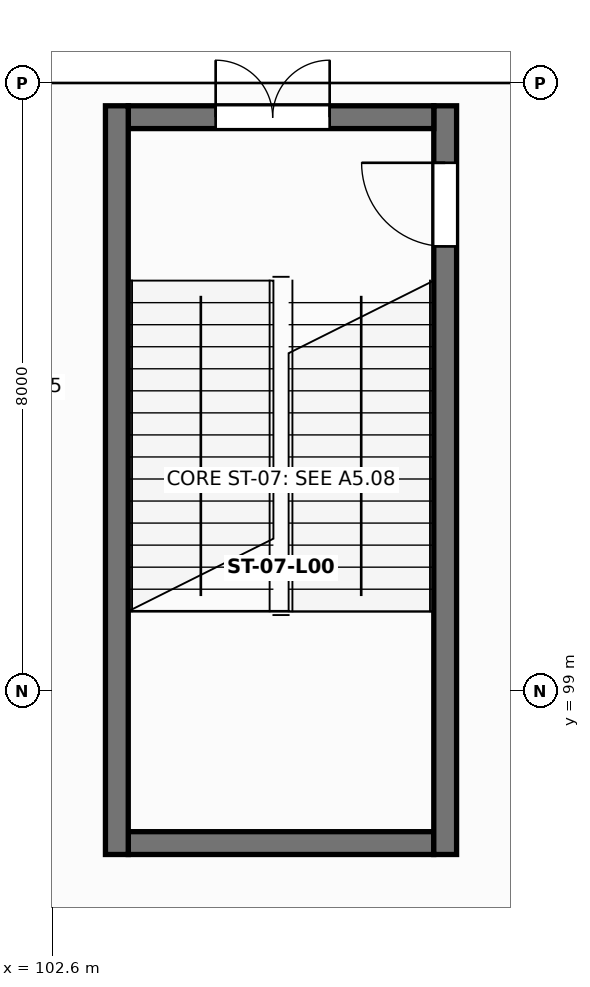
"""IFC4 building model, lengths in metres.
Left out: names, types, materials, properties, quantities, classifications, styles, units other than length and angle.
Written with IfcOpenShell. Run it as: python <this file> out.ifc"""

import sys

from ifc_helpers import new_model, si_unit, direction, frame, frame_2d, origin, place, context, subcontext, project, spatial, rectangle, extrude, element, fill, save


model = new_model("IFC4")
c1 = context("Model", 3, precision=1e-05, world=origin(), true_north=direction((0.0, 1.0)))
c2 = subcontext(c1, "Body", "Model", "MODEL_VIEW")
j1 = project(units=[si_unit("LENGTHUNIT", "METRE"), si_unit("PLANEANGLEUNIT", "RADIAN")], contexts=[c1])
p1 = place(None, origin())
s1 = spatial("IfcSite", under=j1, at=p1, CompositionType="ELEMENT")
p2 = place(p1, origin())
s2 = spatial("IfcBuilding", under=s1, at=p2, CompositionType="ELEMENT")
p3 = place(p2, origin())
s3 = spatial("IfcBuildingStorey", under=s2, at=p3, CompositionType="ELEMENT", Elevation=0.0)
p4 = place(p3, frame((103.6, 97.0, 0.0), z_axis=(0.0, 0.0, 1.0), x_axis=(1.0, 0.0, 0.0)))
e1 = element("IfcWall", 1, at=p4, inside=s3, PredefinedType="SHEAR", context=c2, shape_type="SweptSolid", body=[
    extrude(rectangle(XDim=4.02, YDim=0.3, at=frame_2d((2.01, 0.0))), origin(), (0.0, 0.0, 1.0), 5.755),
])
p5 = place(p3, frame((107.77, 96.85, 0.0), z_axis=(0.0, 0.0, 1.0), x_axis=(0.0, 1.0, 0.0)))
e2 = element("IfcWall", 2, at=p5, inside=s3, PredefinedType="SHEAR", context=c2, shape_type="SweptSolid", body=[
    extrude(rectangle(XDim=9.85, YDim=0.3, at=frame_2d((4.925, 0.0))), origin(), (0.0, 0.0, 1.0), 5.755),
])
p6 = place(p5, frame((8.0, 0.0, 0.0)))
e3 = element("IfcOpeningElement", 3, at=p6, cuts=e2, PredefinedType="OPENING", context=c2, shape_type="SweptSolid", body=[
    extrude(rectangle(XDim=1.1, YDim=2.15, at=frame_2d((0.55, 1.075))), frame((0.0, 0.16, 0.0), z_axis=(0.0, -1.0, 0.0), x_axis=(1.0, 0.0, 0.0)), (0.0, 0.0, 1.0), 0.32),
])
p7 = place(p3, frame((107.62, 106.55, 0.0), z_axis=(0.0, 0.0, 1.0), x_axis=(-1.0, 0.0, 0.0)))
e4 = element("IfcWall", 4, at=p7, inside=s3, PredefinedType="SHEAR", context=c2, shape_type="SweptSolid", body=[
    extrude(rectangle(XDim=4.02, YDim=0.3, at=frame_2d((2.01, 0.0))), origin(), (0.0, 0.0, 1.0), 5.755),
])
p8 = place(p7, frame((1.37, 0.0, 0.0)))
e5 = element("IfcOpeningElement", 5, at=p8, cuts=e4, PredefinedType="OPENING", context=c2, shape_type="SweptSolid", body=[
    extrude(rectangle(XDim=1.5, YDim=2.2, at=frame_2d((0.75, 1.1))), frame((0.0, 0.16, 0.0), z_axis=(0.0, -1.0, 0.0), x_axis=(1.0, 0.0, 0.0)), (0.0, 0.0, 1.0), 0.32),
])
p9 = place(p3, frame((103.45, 106.7, 0.0), z_axis=(0.0, 0.0, 1.0), x_axis=(0.0, -1.0, 0.0)))
e6 = element("IfcWall", 6, at=p9, inside=s3, PredefinedType="SHEAR", context=c2, shape_type="SweptSolid", body=[
    extrude(rectangle(XDim=9.85, YDim=0.3, at=frame_2d((4.925, 0.0))), origin(), (0.0, 0.0, 1.0), 5.755),
])
p10 = place(p6, origin())
e7 = element("IfcDoor", 7, at=p10, inside=s3, OperationType="SINGLE_SWING_RIGHT", PredefinedType="DOOR", context=c2, shape_type="SweptSolid", body=[
    extrude(rectangle(XDim=1.1, YDim=2.15, at=frame_2d((0.55, 1.075))), frame((0.0, 0.025, 0.0), z_axis=(0.0, -1.0, 0.0), x_axis=(1.0, 0.0, 0.0)), (0.0, 0.0, 1.0), 0.05),
])
fill(e3, e7)
p11 = place(p8, frame((1.5, 0.0, 0.0), z_axis=(0.0, 0.0, 1.0), x_axis=(-1.0, 0.0, 0.0)))
e8 = element("IfcDoor", 8, at=p11, inside=s3, OperationType="DOUBLE_DOOR_SINGLE_SWING", PredefinedType="DOOR", context=c2, shape_type="SweptSolid", body=[
    extrude(rectangle(XDim=1.5, YDim=2.2, at=frame_2d((0.75, 1.1))), frame((0.0, 0.025, 0.0), z_axis=(0.0, -1.0, 0.0), x_axis=(1.0, 0.0, 0.0)), (0.0, 0.0, 1.0), 0.05),
])
fill(e5, e8)
save(model, sys.argv[1])
